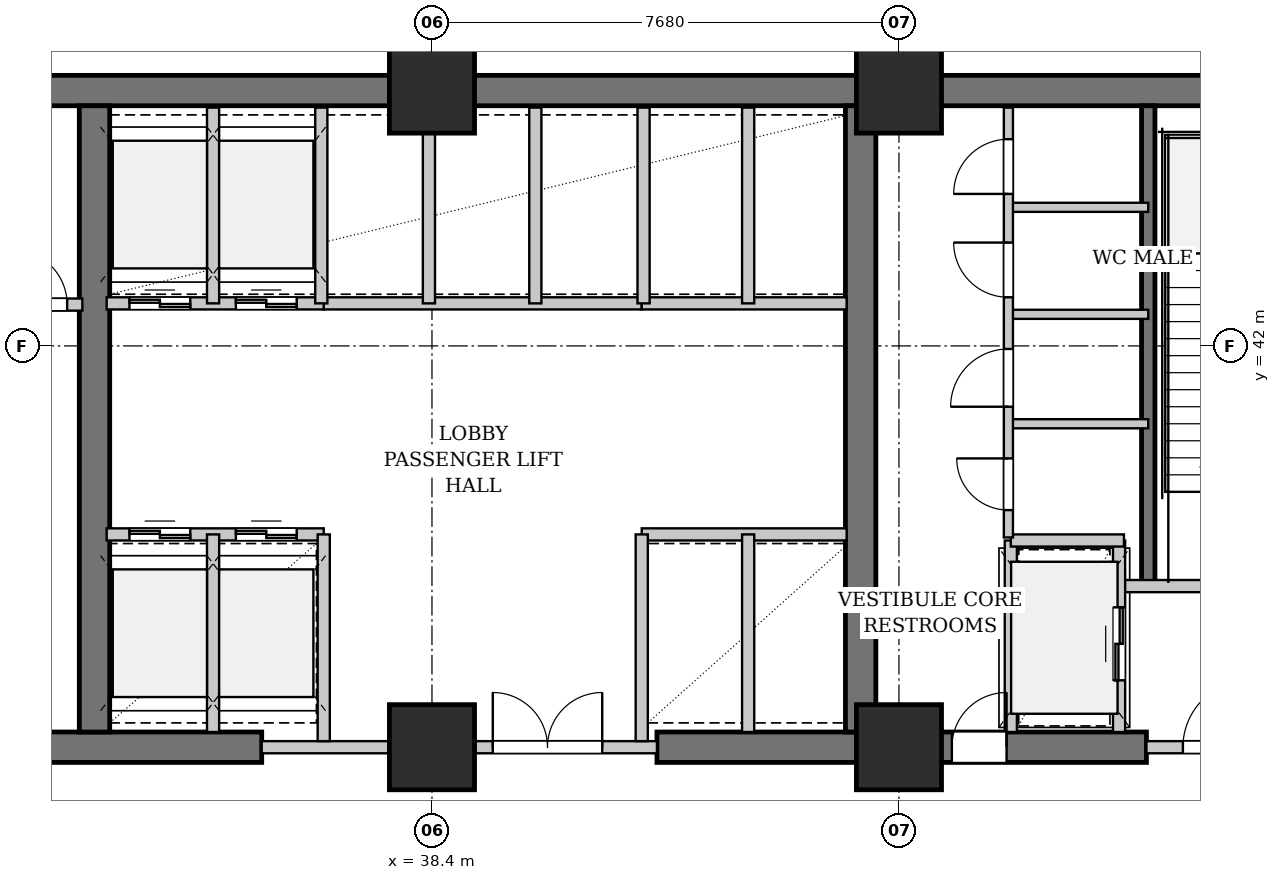
"""IFC4 building model, lengths in metres.
Left out: names, types, materials, properties, quantities, classifications, styles, units other than length and angle.
Written with IfcOpenShell. Run it as: python <this file> out.ifc"""

import sys

from ifc_helpers import new_model, si_unit, direction, frame, frame_2d, origin, origin_2d, place, context, subcontext, project, spatial, rectangle, extrude, element, fill, save


model = new_model("IFC4")
c1 = context("Model", 3, precision=1e-05, world=origin(), true_north=direction((0.0, 1.0)))
c2 = subcontext(c1, "Body", "Model", "MODEL_VIEW")
j1 = project(units=[si_unit("LENGTHUNIT", "METRE"), si_unit("PLANEANGLEUNIT", "RADIAN")], contexts=[c1])
p1 = place(None, origin())
s1 = spatial("IfcSite", under=j1, at=p1, CompositionType="ELEMENT")
p2 = place(p1, origin())
s2 = spatial("IfcBuilding", under=s1, at=p2, CompositionType="ELEMENT")
p3 = place(p2, frame((0.0, 0.0, 10.4)))
s3 = spatial("IfcBuildingStorey", under=s2, at=p3, CompositionType="ELEMENT", Elevation=10.4)
p4 = place(p3, frame((22.79, 46.2, 0.0), z_axis=(0.0, 0.0, 1.0), x_axis=(1.0, 0.0, 0.0)))
e1 = element("IfcWall", 1, at=p4, inside=s3, PredefinedType="SHEAR", context=c2, shape_type="SweptSolid", body=[
    extrude(rectangle(XDim=31.22, YDim=0.5, at=frame_2d((15.61, 0.0))), origin(), (0.0, 0.0, 1.0), 4.94),
])
p5 = place(p3, frame((30.72, 35.4, 0.0), z_axis=(0.0, 0.0, 1.0), x_axis=(1.0, 0.0, 0.0)))
e2 = element("IfcWall", 2, at=p5, inside=s3, PredefinedType="SHEAR", context=c2, shape_type="SweptSolid", body=[
    extrude(rectangle(XDim=4.88, YDim=0.5, at=frame_2d((2.44, 0.0))), origin(), (0.0, 0.0, 1.0), 4.94),
])
p6 = place(p3, frame((42.1, 35.4, 0.0), z_axis=(0.0, 0.0, 1.0), x_axis=(1.0, 0.0, 0.0)))
e3 = element("IfcWall", 3, at=p6, inside=s3, PredefinedType="SHEAR", context=c2, shape_type="SweptSolid", body=[
    extrude(rectangle(XDim=8.05, YDim=0.5, at=frame_2d((4.025, 0.0))), origin(), (0.0, 0.0, 1.0), 4.94),
])
p7 = place(p6, frame((4.85, 0.0, 0.0)))
e4 = element("IfcOpeningElement", 4, at=p7, cuts=e3, PredefinedType="OPENING", context=c2, shape_type="SweptSolid", body=[
    extrude(rectangle(XDim=0.9, YDim=2.15, at=frame_2d((0.45, 1.075))), frame((0.0, 0.26, 0.0), z_axis=(0.0, -1.0, 0.0), x_axis=(1.0, 0.0, 0.0)), (0.0, 0.0, 1.0), 0.52),
])
for number, where, z_axis, x_axis in (
    (5, (32.85, 35.65, 0.0), (0.0, 0.0, 1.0), (0.0, 1.0, 0.0)),
    (6, (45.45, 35.65, 0.0), (0.0, 0.0, 1.0), (0.0, 1.0, 0.0)),
):
    element("IfcWall", number, at=place(p3, frame(where, z_axis=z_axis, x_axis=x_axis)), inside=s3, PredefinedType="SHEAR", context=c2, shape_type="SweptSolid", body=[
        extrude(rectangle(XDim=10.3, YDim=0.5, at=frame_2d((5.15, 0.0))), origin(), (0.0, 0.0, 1.0), 4.94),
    ])
p8 = place(p3, frame((50.18, 38.05, 0.0), z_axis=(0.0, 0.0, 1.0), x_axis=(0.0, 1.0, 0.0)))
e7 = element("IfcWall", 7, at=p8, inside=s3, PredefinedType="SHEAR", context=c2, shape_type="SweptSolid", body=[
    extrude(rectangle(XDim=7.9, YDim=0.22, at=frame_2d((3.95, 0.0))), origin(), (0.0, 0.0, 1.0), 4.94),
])
for number, where, z_axis, x_axis in (
    (8, (38.4, 35.4, 0.0), (0.0, 0.0, 1.0), (1.0, 0.0, 0.0)),
    (9, (38.4, 46.2, 0.0), (0.0, 0.0, 1.0), (1.0, 0.0, 0.0)),
    (10, (46.08, 35.4, 0.0), (0.0, 0.0, 1.0), (1.0, 0.0, 0.0)),
    (11, (46.08, 46.2, 0.0), (0.0, 0.0, 1.0), (1.0, 0.0, 0.0)),
):
    element("IfcColumn", number, at=place(p3, frame(where, z_axis=z_axis, x_axis=x_axis)), inside=s3, PredefinedType="COLUMN", context=c2, shape_type="SweptSolid", body=[
        extrude(rectangle(XDim=1.4, YDim=1.4, at=origin_2d()), origin(), (0.0, 0.0, 1.0), 5.2),
    ])
p9 = place(p3, frame((27.32, 42.68, 0.0), z_axis=(0.0, 0.0, 1.0), x_axis=(1.0, 0.0, 0.0)))
e12 = element("IfcWall", 12, at=p9, inside=s3, PredefinedType="PARTITIONING", context=c2, shape_type="SweptSolid", body=[
    extrude(rectangle(XDim=5.33, YDim=0.2, at=frame_2d((2.665, 0.0))), origin(), (0.0, 0.0, 1.0), 4.94),
])
p10 = place(p9, frame((4.18, 0.0, 0.0)))
e13 = element("IfcOpeningElement", 13, at=p10, cuts=e12, PredefinedType="OPENING", context=c2, shape_type="SweptSolid", body=[
    extrude(rectangle(XDim=0.9, YDim=2.15, at=frame_2d((0.45, 1.075))), frame((0.0, 0.11, 0.0), z_axis=(0.0, -1.0, 0.0), x_axis=(1.0, 0.0, 0.0)), (0.0, 0.0, 1.0), 0.22),
])
p11 = place(p3, frame((35.6, 35.4, 0.0), z_axis=(0.0, 0.0, 1.0), x_axis=(1.0, 0.0, 0.0)))
e14 = element("IfcWall", 14, at=p11, inside=s3, PredefinedType="PARTITIONING", context=c2, shape_type="SweptSolid", body=[
    extrude(rectangle(XDim=6.5, YDim=0.2, at=frame_2d((3.25, 0.0))), origin(), (0.0, 0.0, 1.0), 4.035),
])
p12 = place(p11, frame((3.8, 0.0, 0.0)))
e15 = element("IfcOpeningElement", 15, at=p12, cuts=e14, PredefinedType="OPENING", context=c2, shape_type="SweptSolid", body=[
    extrude(rectangle(XDim=1.8, YDim=2.3, at=frame_2d((0.9, 1.15))), frame((0.0, 0.11, 0.0), z_axis=(0.0, -1.0, 0.0), x_axis=(1.0, 0.0, 0.0)), (0.0, 0.0, 1.0), 0.22),
])
p13 = place(p3, frame((36.6, 42.7, 0.0), z_axis=(0.0, 0.0, 1.0), x_axis=(1.0, 0.0, 0.0)))
e16 = element("IfcWall", 16, at=p13, inside=s3, PredefinedType="PARTITIONING", context=c2, shape_type="SweptSolid", body=[
    extrude(rectangle(XDim=5.25, YDim=0.2, at=frame_2d((2.625, 0.0))), origin(), (0.0, 0.0, 1.0), 4.94),
])
p14 = place(p3, frame((38.35, 42.7, 0.0), z_axis=(0.0, 0.0, 1.0), x_axis=(0.0, 1.0, 0.0)))
e17 = element("IfcWall", 17, at=p14, inside=s3, PredefinedType="PARTITIONING", context=c2, shape_type="SweptSolid", body=[
    extrude(rectangle(XDim=3.22, YDim=0.2, at=frame_2d((1.61, 0.0))), origin(), (0.0, 0.0, 1.0), 4.035),
])
p15 = place(p3, frame((40.1, 42.7, 0.0), z_axis=(0.0, 0.0, 1.0), x_axis=(0.0, 1.0, 0.0)))
e18 = element("IfcWall", 18, at=p15, inside=s3, PredefinedType="PARTITIONING", context=c2, shape_type="SweptSolid", body=[
    extrude(rectangle(XDim=3.22, YDim=0.2, at=frame_2d((1.61, 0.0))), origin(), (0.0, 0.0, 1.0), 4.94),
])
p16 = place(p3, frame((33.05, 38.9, 0.0), z_axis=(0.0, 0.0, 1.0), x_axis=(1.0, 0.0, 0.0)))
e19 = element("IfcWall", 19, at=p16, inside=s3, PredefinedType="PARTITIONING", context=c2, shape_type="SweptSolid", body=[
    extrude(rectangle(XDim=3.57, YDim=0.2, at=frame_2d((1.785, 0.0))), origin(), (0.0, 0.0, 1.0), 4.94),
])
p17 = place(p16, frame((0.375, 0.0, 0.0)))
e20 = element("IfcOpeningElement", 20, at=p17, cuts=e19, PredefinedType="OPENING", context=c2, shape_type="SweptSolid", body=[
    extrude(rectangle(XDim=1.0, YDim=2.2, at=frame_2d((0.5, 1.1))), frame((0.0, 0.11, 0.0), z_axis=(0.0, -1.0, 0.0), x_axis=(1.0, 0.0, 0.0)), (0.0, 0.0, 1.0), 0.22),
])
p18 = place(p16, frame((2.125, 0.0, 0.0)))
e21 = element("IfcOpeningElement", 21, at=p18, cuts=e19, PredefinedType="OPENING", context=c2, shape_type="SweptSolid", body=[
    extrude(rectangle(XDim=1.0, YDim=2.2, at=frame_2d((0.5, 1.1))), frame((0.0, 0.11, 0.0), z_axis=(0.0, -1.0, 0.0), x_axis=(1.0, 0.0, 0.0)), (0.0, 0.0, 1.0), 0.22),
])
p19 = place(p3, frame((33.05, 42.7, 0.0), z_axis=(0.0, 0.0, 1.0), x_axis=(1.0, 0.0, 0.0)))
e22 = element("IfcWall", 22, at=p19, inside=s3, PredefinedType="PARTITIONING", context=c2, shape_type="SweptSolid", body=[
    extrude(rectangle(XDim=3.57, YDim=0.2, at=frame_2d((1.785, 0.0))), origin(), (0.0, 0.0, 1.0), 4.94),
])
p20 = place(p19, frame((0.375, 0.0, 0.0)))
e23 = element("IfcOpeningElement", 23, at=p20, cuts=e22, PredefinedType="OPENING", context=c2, shape_type="SweptSolid", body=[
    extrude(rectangle(XDim=1.0, YDim=2.2, at=frame_2d((0.5, 1.1))), frame((0.0, 0.11, 0.0), z_axis=(0.0, -1.0, 0.0), x_axis=(1.0, 0.0, 0.0)), (0.0, 0.0, 1.0), 0.22),
])
p21 = place(p19, frame((2.125, 0.0, 0.0)))
e24 = element("IfcOpeningElement", 24, at=p21, cuts=e22, PredefinedType="OPENING", context=c2, shape_type="SweptSolid", body=[
    extrude(rectangle(XDim=1.0, YDim=2.2, at=frame_2d((0.5, 1.1))), frame((0.0, 0.11, 0.0), z_axis=(0.0, -1.0, 0.0), x_axis=(1.0, 0.0, 0.0)), (0.0, 0.0, 1.0), 0.22),
])
p22 = place(p3, frame((34.8, 35.65, 0.0), z_axis=(0.0, 0.0, 1.0), x_axis=(0.0, 1.0, 0.0)))
e25 = element("IfcWall", 25, at=p22, inside=s3, PredefinedType="PARTITIONING", context=c2, shape_type="SweptSolid", body=[
    extrude(rectangle(XDim=3.25, YDim=0.2, at=frame_2d((1.625, 0.0))), origin(), (0.0, 0.0, 1.0), 4.94),
])
p23 = place(p3, frame((34.8, 42.7, 0.0), z_axis=(0.0, 0.0, 1.0), x_axis=(0.0, 1.0, 0.0)))
e26 = element("IfcWall", 26, at=p23, inside=s3, PredefinedType="PARTITIONING", context=c2, shape_type="SweptSolid", body=[
    extrude(rectangle(XDim=3.22, YDim=0.2, at=frame_2d((1.61, 0.0))), origin(), (0.0, 0.0, 1.0), 4.94),
])
p24 = place(p3, frame((36.62, 35.5, 0.0), z_axis=(0.0, 0.0, 1.0), x_axis=(0.0, 1.0, 0.0)))
e27 = element("IfcWall", 27, at=p24, inside=s3, PredefinedType="PARTITIONING", context=c2, shape_type="SweptSolid", body=[
    extrude(rectangle(XDim=3.4, YDim=0.2, at=frame_2d((1.7, 0.0))), origin(), (0.0, 0.0, 1.0), 4.94),
])
p25 = place(p3, frame((36.58, 42.7, 0.0), z_axis=(0.0, 0.0, 1.0), x_axis=(0.0, 1.0, 0.0)))
e28 = element("IfcWall", 28, at=p25, inside=s3, PredefinedType="PARTITIONING", context=c2, shape_type="SweptSolid", body=[
    extrude(rectangle(XDim=3.22, YDim=0.2, at=frame_2d((1.61, 0.0))), origin(), (0.0, 0.0, 1.0), 4.94),
])
for number, where, z_axis, x_axis in (
    (29, (41.85, 38.9, 0.0), (0.0, 0.0, 1.0), (1.0, 0.0, 0.0)),
    (30, (41.85, 42.7, 0.0), (0.0, 0.0, 1.0), (1.0, 0.0, 0.0)),
):
    element("IfcWall", number, at=place(p3, frame(where, z_axis=z_axis, x_axis=x_axis)), inside=s3, PredefinedType="PARTITIONING", context=c2, shape_type="SweptSolid", body=[
        extrude(rectangle(XDim=3.37, YDim=0.2, at=frame_2d((1.685, 0.0))), origin(), (0.0, 0.0, 1.0), 4.94),
    ])
p26 = place(p3, frame((43.6, 35.65, 0.0), z_axis=(0.0, 0.0, 1.0), x_axis=(0.0, 1.0, 0.0)))
e31 = element("IfcWall", 31, at=p26, inside=s3, PredefinedType="PARTITIONING", context=c2, shape_type="SweptSolid", body=[
    extrude(rectangle(XDim=3.25, YDim=0.2, at=frame_2d((1.625, 0.0))), origin(), (0.0, 0.0, 1.0), 4.94),
])
p27 = place(p3, frame((43.6, 42.7, 0.0), z_axis=(0.0, 0.0, 1.0), x_axis=(0.0, 1.0, 0.0)))
e32 = element("IfcWall", 32, at=p27, inside=s3, PredefinedType="PARTITIONING", context=c2, shape_type="SweptSolid", body=[
    extrude(rectangle(XDim=3.22, YDim=0.2, at=frame_2d((1.61, 0.0))), origin(), (0.0, 0.0, 1.0), 4.94),
])
p28 = place(p3, frame((41.85, 35.5, 0.0), z_axis=(0.0, 0.0, 1.0), x_axis=(0.0, 1.0, 0.0)))
e33 = element("IfcWall", 33, at=p28, inside=s3, PredefinedType="PARTITIONING", context=c2, shape_type="SweptSolid", body=[
    extrude(rectangle(XDim=3.4, YDim=0.2, at=frame_2d((1.7, 0.0))), origin(), (0.0, 0.0, 1.0), 4.94),
])
p29 = place(p3, frame((41.88, 42.7, 0.0), z_axis=(0.0, 0.0, 1.0), x_axis=(0.0, 1.0, 0.0)))
e34 = element("IfcWall", 34, at=p29, inside=s3, PredefinedType="PARTITIONING", context=c2, shape_type="SweptSolid", body=[
    extrude(rectangle(XDim=3.22, YDim=0.2, at=frame_2d((1.61, 0.0))), origin(), (0.0, 0.0, 1.0), 4.94),
])
p30 = place(p3, frame((49.78, 38.05, 0.0), z_axis=(0.0, 0.0, 1.0), x_axis=(1.0, 0.0, 0.0)))
e35 = element("IfcWall", 35, at=p30, inside=s3, PredefinedType="PARTITIONING", context=c2, shape_type="SweptSolid", body=[
    extrude(rectangle(XDim=3.72, YDim=0.2, at=frame_2d((1.86, 0.0))), origin(), (0.0, 0.0, 1.0), 4.94),
])
p31 = place(p30, frame((1.436, 0.0, 0.0)))
e36 = element("IfcOpeningElement", 36, at=p31, cuts=e35, PredefinedType="OPENING", context=c2, shape_type="SweptSolid", body=[
    extrude(rectangle(XDim=1.1, YDim=2.15, at=frame_2d((0.55, 1.075))), frame((0.0, 0.11, 0.0), z_axis=(0.0, -1.0, 0.0), x_axis=(1.0, 0.0, 0.0)), (0.0, 0.0, 1.0), 0.22),
])
p32 = place(p3, frame((50.15, 35.4, 0.0), z_axis=(0.0, 0.0, 1.0), x_axis=(1.0, 0.0, 0.0)))
e37 = element("IfcWall", 37, at=p32, inside=s3, PredefinedType="PARTITIONING", context=c2, shape_type="SweptSolid", body=[
    extrude(rectangle(XDim=2.3, YDim=0.2, at=frame_2d((1.15, 0.0))), origin(), (0.0, 0.0, 1.0), 4.035),
])
p33 = place(p32, frame((0.6, 0.0, 0.0)))
e38 = element("IfcOpeningElement", 38, at=p33, cuts=e37, PredefinedType="OPENING", context=c2, shape_type="SweptSolid", body=[
    extrude(rectangle(XDim=1.1, YDim=2.15, at=frame_2d((0.55, 1.075))), frame((0.0, 0.11, 0.0), z_axis=(0.0, -1.0, 0.0), x_axis=(1.0, 0.0, 0.0)), (0.0, 0.0, 1.0), 0.22),
])
p34 = place(p3, frame((49.7, 35.65, 0.0), z_axis=(0.0, 0.0, 1.0), x_axis=(0.0, 1.0, 0.0)))
e39 = element("IfcWall", 39, at=p34, inside=s3, PredefinedType="PARTITIONING", context=c2, shape_type="SweptSolid", body=[
    extrude(rectangle(XDim=3.15, YDim=0.2, at=frame_2d((1.575, 0.0))), origin(), (0.0, 0.0, 1.0), 4.94),
])
p35 = place(p34, frame((0.85, 0.0, 0.0)))
e40 = element("IfcOpeningElement", 40, at=p35, cuts=e39, PredefinedType="OPENING", context=c2, shape_type="SweptSolid", body=[
    extrude(rectangle(XDim=1.2, YDim=2.2, at=frame_2d((0.6, 1.1))), frame((0.0, 0.11, 0.0), z_axis=(0.0, -1.0, 0.0), x_axis=(1.0, 0.0, 0.0)), (0.0, 0.0, 1.0), 0.22),
])
p36 = place(p3, frame((47.92, 35.65, 0.0), z_axis=(0.0, 0.0, 1.0), x_axis=(0.0, 1.0, 0.0)))
e41 = element("IfcWall", 41, at=p36, inside=s3, PredefinedType="PARTITIONING", context=c2, shape_type="SweptSolid", body=[
    extrude(rectangle(XDim=3.15, YDim=0.2, at=frame_2d((1.575, 0.0))), origin(), (0.0, 0.0, 1.0), 4.94),
])
p37 = place(p3, frame((47.92, 38.8, 0.0), z_axis=(0.0, 0.0, 1.0), x_axis=(1.0, 0.0, 0.0)))
e42 = element("IfcWall", 42, at=p37, inside=s3, PredefinedType="PARTITIONING", context=c2, shape_type="SweptSolid", body=[
    extrude(rectangle(XDim=1.86, YDim=0.2, at=frame_2d((0.93, 0.0))), origin(), (0.0, 0.0, 1.0), 4.94),
])
for number, where, z_axis, x_axis in (
    (43, (47.88, 40.72, 0.0), (0.0, 0.0, 1.0), (1.0, 0.0, 0.0)),
    (44, (47.88, 42.52, 0.0), (0.0, 0.0, 1.0), (1.0, 0.0, 0.0)),
    (45, (47.88, 44.28, 0.0), (0.0, 0.0, 1.0), (1.0, 0.0, 0.0)),
):
    element("IfcWall", number, at=place(p3, frame(where, z_axis=z_axis, x_axis=x_axis)), inside=s3, PredefinedType="PARTITIONING", context=c2, shape_type="SweptSolid", body=[
        extrude(rectangle(XDim=2.3, YDim=0.15, at=frame_2d((1.15, 0.0))), origin(), (0.0, 0.0, 1.0), 4.94),
    ])
p38 = place(p3, frame((47.88, 38.85, 0.0), z_axis=(0.0, 0.0, 1.0), x_axis=(0.0, 1.0, 0.0)))
e46 = element("IfcWall", 46, at=p38, inside=s3, PredefinedType="PARTITIONING", context=c2, shape_type="SweptSolid", body=[
    extrude(rectangle(XDim=7.07, YDim=0.15, at=frame_2d((3.535, 0.0))), origin(), (0.0, 0.0, 1.0), 4.94),
])
p39 = place(p38, frame((0.45, 0.0, 0.0)))
e47 = element("IfcOpeningElement", 47, at=p39, cuts=e46, PredefinedType="OPENING", context=c2, shape_type="SweptSolid", body=[
    extrude(rectangle(XDim=0.85, YDim=2.15, at=frame_2d((0.425, 1.075))), frame((0.0, 0.085, 0.0), z_axis=(0.0, -1.0, 0.0), x_axis=(1.0, 0.0, 0.0)), (0.0, 0.0, 1.0), 0.17),
])
p40 = place(p38, frame((2.15, 0.0, 0.0)))
e48 = element("IfcOpeningElement", 48, at=p40, cuts=e46, PredefinedType="OPENING", context=c2, shape_type="SweptSolid", body=[
    extrude(rectangle(XDim=0.95, YDim=2.15, at=frame_2d((0.475, 1.075))), frame((0.0, 0.085, 0.0), z_axis=(0.0, -1.0, 0.0), x_axis=(1.0, 0.0, 0.0)), (0.0, 0.0, 1.0), 0.17),
])
p41 = place(p38, frame((3.95, 0.0, 0.0)))
e49 = element("IfcOpeningElement", 49, at=p41, cuts=e46, PredefinedType="OPENING", context=c2, shape_type="SweptSolid", body=[
    extrude(rectangle(XDim=0.9, YDim=2.15, at=frame_2d((0.45, 1.075))), frame((0.0, 0.085, 0.0), z_axis=(0.0, -1.0, 0.0), x_axis=(1.0, 0.0, 0.0)), (0.0, 0.0, 1.0), 0.17),
])
p42 = place(p38, frame((5.65, 0.0, 0.0)))
e50 = element("IfcOpeningElement", 50, at=p42, cuts=e46, PredefinedType="OPENING", context=c2, shape_type="SweptSolid", body=[
    extrude(rectangle(XDim=0.9, YDim=2.15, at=frame_2d((0.45, 1.075))), frame((0.0, 0.085, 0.0), z_axis=(0.0, -1.0, 0.0), x_axis=(1.0, 0.0, 0.0)), (0.0, 0.0, 1.0), 0.17),
])
p43 = place(p10, origin())
e51 = element("IfcDoor", 51, at=p43, inside=s3, OperationType="SINGLE_SWING_LEFT", PredefinedType="DOOR", context=c2, shape_type="SweptSolid", body=[
    extrude(rectangle(XDim=0.9, YDim=2.15, at=frame_2d((0.45, 1.075))), frame((0.0, 0.025, 0.0), z_axis=(0.0, -1.0, 0.0), x_axis=(1.0, 0.0, 0.0)), (0.0, 0.0, 1.0), 0.05),
])
fill(e13, e51)
p44 = place(p12, origin())
e52 = element("IfcDoor", 52, at=p44, inside=s3, OperationType="DOUBLE_DOOR_SINGLE_SWING", PredefinedType="DOOR", context=c2, shape_type="SweptSolid", body=[
    extrude(rectangle(XDim=1.8, YDim=2.3, at=frame_2d((0.9, 1.15))), frame((0.0, 0.025, 0.0), z_axis=(0.0, -1.0, 0.0), x_axis=(1.0, 0.0, 0.0)), (0.0, 0.0, 1.0), 0.05),
])
fill(e15, e52)
p45 = place(p17, origin())
e53 = element("IfcDoor", 53, at=p45, inside=s3, OperationType="DOUBLE_DOOR_SLIDING", PredefinedType="DOOR", context=c2, shape_type="SweptSolid", body=[
    extrude(rectangle(XDim=1.0, YDim=2.2, at=frame_2d((0.5, 1.1))), frame((0.0, 0.025, 0.0), z_axis=(0.0, -1.0, 0.0), x_axis=(1.0, 0.0, 0.0)), (0.0, 0.0, 1.0), 0.05),
])
fill(e20, e53)
p46 = place(p18, origin())
e54 = element("IfcDoor", 54, at=p46, inside=s3, OperationType="DOUBLE_DOOR_SLIDING", PredefinedType="DOOR", context=c2, shape_type="SweptSolid", body=[
    extrude(rectangle(XDim=1.0, YDim=2.2, at=frame_2d((0.5, 1.1))), frame((0.0, 0.025, 0.0), z_axis=(0.0, -1.0, 0.0), x_axis=(1.0, 0.0, 0.0)), (0.0, 0.0, 1.0), 0.05),
])
fill(e21, e54)
p47 = place(p20, origin())
e55 = element("IfcDoor", 55, at=p47, inside=s3, OperationType="DOUBLE_DOOR_SLIDING", PredefinedType="DOOR", context=c2, shape_type="SweptSolid", body=[
    extrude(rectangle(XDim=1.0, YDim=2.2, at=frame_2d((0.5, 1.1))), frame((0.0, 0.025, 0.0), z_axis=(0.0, -1.0, 0.0), x_axis=(1.0, 0.0, 0.0)), (0.0, 0.0, 1.0), 0.05),
])
fill(e23, e55)
p48 = place(p21, origin())
e56 = element("IfcDoor", 56, at=p48, inside=s3, OperationType="DOUBLE_DOOR_SLIDING", PredefinedType="DOOR", context=c2, shape_type="SweptSolid", body=[
    extrude(rectangle(XDim=1.0, YDim=2.2, at=frame_2d((0.5, 1.1))), frame((0.0, 0.025, 0.0), z_axis=(0.0, -1.0, 0.0), x_axis=(1.0, 0.0, 0.0)), (0.0, 0.0, 1.0), 0.05),
])
fill(e24, e56)
p49 = place(p33, origin())
e57 = element("IfcDoor", 57, at=p49, inside=s3, OperationType="SINGLE_SWING_RIGHT", PredefinedType="DOOR", context=c2, shape_type="SweptSolid", body=[
    extrude(rectangle(XDim=1.1, YDim=2.15, at=frame_2d((0.55, 1.075))), frame((0.0, 0.025, 0.0), z_axis=(0.0, -1.0, 0.0), x_axis=(1.0, 0.0, 0.0)), (0.0, 0.0, 1.0), 0.05),
])
fill(e38, e57)
p50 = place(p35, origin())
e58 = element("IfcDoor", 58, at=p50, inside=s3, OperationType="DOUBLE_DOOR_SLIDING", PredefinedType="DOOR", context=c2, shape_type="SweptSolid", body=[
    extrude(rectangle(XDim=1.2, YDim=2.2, at=frame_2d((0.6, 1.1))), frame((0.0, 0.025, 0.0), z_axis=(0.0, -1.0, 0.0), x_axis=(1.0, 0.0, 0.0)), (0.0, 0.0, 1.0), 0.05),
])
fill(e40, e58)
p51 = place(p39, origin())
e59 = element("IfcDoor", 59, at=p51, inside=s3, OperationType="SINGLE_SWING_RIGHT", PredefinedType="DOOR", context=c2, shape_type="SweptSolid", body=[
    extrude(rectangle(XDim=0.85, YDim=2.15, at=frame_2d((0.425, 1.075))), frame((0.0, 0.025, 0.0), z_axis=(0.0, -1.0, 0.0), x_axis=(1.0, 0.0, 0.0)), (0.0, 0.0, 1.0), 0.05),
])
fill(e47, e59)
p52 = place(p40, origin())
e60 = element("IfcDoor", 60, at=p52, inside=s3, OperationType="SINGLE_SWING_LEFT", PredefinedType="DOOR", context=c2, shape_type="SweptSolid", body=[
    extrude(rectangle(XDim=0.95, YDim=2.15, at=frame_2d((0.475, 1.075))), frame((0.0, 0.025, 0.0), z_axis=(0.0, -1.0, 0.0), x_axis=(1.0, 0.0, 0.0)), (0.0, 0.0, 1.0), 0.05),
])
fill(e48, e60)
p53 = place(p41, origin())
e61 = element("IfcDoor", 61, at=p53, inside=s3, OperationType="SINGLE_SWING_RIGHT", PredefinedType="DOOR", context=c2, shape_type="SweptSolid", body=[
    extrude(rectangle(XDim=0.9, YDim=2.15, at=frame_2d((0.45, 1.075))), frame((0.0, 0.025, 0.0), z_axis=(0.0, -1.0, 0.0), x_axis=(1.0, 0.0, 0.0)), (0.0, 0.0, 1.0), 0.05),
])
fill(e49, e61)
p54 = place(p42, origin())
e62 = element("IfcDoor", 62, at=p54, inside=s3, OperationType="SINGLE_SWING_LEFT", PredefinedType="DOOR", context=c2, shape_type="SweptSolid", body=[
    extrude(rectangle(XDim=0.9, YDim=2.15, at=frame_2d((0.45, 1.075))), frame((0.0, 0.025, 0.0), z_axis=(0.0, -1.0, 0.0), x_axis=(1.0, 0.0, 0.0)), (0.0, 0.0, 1.0), 0.05),
])
fill(e50, e62)
p55 = place(p7, origin())
e63 = element("IfcDoor", 63, at=p55, inside=s3, OperationType="SINGLE_SWING_RIGHT", PredefinedType="DOOR", context=c2, shape_type="SweptSolid", body=[
    extrude(rectangle(XDim=0.9, YDim=2.15, at=frame_2d((0.45, 1.075))), frame((0.0, 0.025, 0.0), z_axis=(0.0, -1.0, 0.0), x_axis=(1.0, 0.0, 0.0)), (0.0, 0.0, 1.0), 0.05),
])
fill(e4, e63)
save(model, sys.argv[1])
